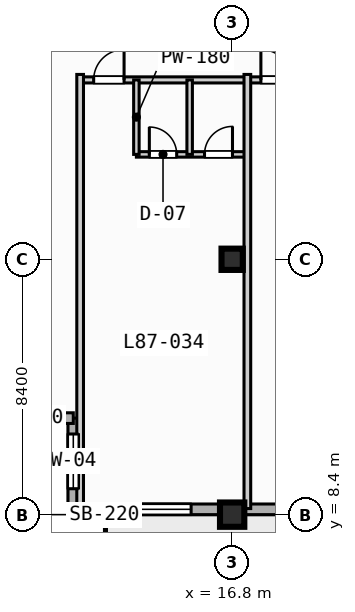
"""IFC4 building model, lengths in metres.
Left out: names, types, materials, properties, quantities, classifications, styles, units other than length and angle.
Written with IfcOpenShell. Run it as: python <this file> out.ifc"""

import sys

from ifc_helpers import new_model, si_unit, direction, frame, frame_2d, origin, origin_2d, place, context, subcontext, project, spatial, rectangle, extrude, element, fill, save


model = new_model("IFC4")
c1 = context("Model", 3, precision=1e-05, world=origin(), true_north=direction((0.0, 1.0)))
c2 = subcontext(c1, "Body", "Model", "MODEL_VIEW")
j1 = project(units=[si_unit("LENGTHUNIT", "METRE"), si_unit("PLANEANGLEUNIT", "RADIAN")], contexts=[c1])
p1 = place(None, origin())
s1 = spatial("IfcSite", under=j1, at=p1, CompositionType="ELEMENT")
p2 = place(p1, origin())
s2 = spatial("IfcBuilding", under=s1, at=p2, CompositionType="ELEMENT")
p3 = place(p2, frame((0.0, 0.0, 351.5)))
s3 = spatial("IfcBuildingStorey", under=s2, at=p3, CompositionType="ELEMENT", Elevation=351.5)
p4 = place(p3, frame((16.8, 8.4, 0.0), z_axis=(0.0, 0.0, 1.0), x_axis=(1.0, 0.0, 0.0)))
e1 = element("IfcColumn", 1, at=p4, inside=s3, PredefinedType="COLUMN", context=c2, shape_type="SweptSolid", body=[
    extrude(rectangle(XDim=0.8, YDim=0.8, at=origin_2d()), origin(), (0.0, 0.0, 1.0), 3.9),
])
p5 = place(p3, frame((16.8, 16.8, 0.0), z_axis=(0.0, 0.0, 1.0), x_axis=(1.0, 0.0, 0.0)))
e2 = element("IfcColumn", 2, at=p5, inside=s3, PredefinedType="COLUMN", context=c2, shape_type="SweptSolid", body=[
    extrude(rectangle(XDim=0.7, YDim=0.7, at=origin_2d()), origin(), (0.0, 0.0, 1.0), 3.9),
])
p6 = place(p3, frame((11.575, 8.575, 0.0), z_axis=(0.0, 0.0, 1.0), x_axis=(0.0, 1.0, 0.0)))
e3 = element("IfcWall", 3, at=p6, inside=s3, PredefinedType="STANDARD", context=c2, shape_type="SweptSolid", body=[
    extrude(rectangle(XDim=3.0, YDim=0.35, at=frame_2d((1.5, 0.0))), origin(), (0.0, 0.0, 1.0), 3.67),
])
p7 = place(p6, frame((0.677, 0.0, 0.85)))
e4 = element("IfcOpeningElement", 4, at=p7, cuts=e3, PredefinedType="OPENING", context=c2, shape_type="SweptSolid", body=[
    extrude(rectangle(XDim=1.8, YDim=1.8, at=frame_2d((0.9, 0.9))), frame((0.0, 0.185, 0.0), z_axis=(0.0, -1.0, 0.0), x_axis=(1.0, 0.0, 0.0)), (0.0, 0.0, 1.0), 0.37),
])
p8 = place(p3, frame((11.575, 11.575, 0.0), z_axis=(0.0, 0.0, 1.0), x_axis=(-1.0, 0.0, 0.0)))
e5 = element("IfcWall", 5, at=p8, inside=s3, PredefinedType="STANDARD", context=c2, shape_type="SweptSolid", body=[
    extrude(rectangle(XDim=3.0, YDim=0.35, at=frame_2d((1.5, 0.0))), origin(), (0.0, 0.0, 1.0), 3.67),
])
p9 = place(p3, frame((64.025, 8.575, 0.0), z_axis=(0.0, 0.0, 1.0), x_axis=(-1.0, 0.0, 0.0)))
e6 = element("IfcWall", 6, at=p9, inside=s3, PredefinedType="STANDARD", context=c2, shape_type="SweptSolid", body=[
    extrude(rectangle(XDim=52.45, YDim=0.35, at=frame_2d((26.225, 0.0))), origin(), (0.0, 0.0, 1.0), 3.67),
])
p10 = place(p9, frame((33.425, 0.0, 0.0)))
e7 = element("IfcOpeningElement", 7, at=p10, cuts=e6, PredefinedType="OPENING", context=c2, shape_type="SweptSolid", body=[
    extrude(rectangle(XDim=1.4, YDim=2.2, at=frame_2d((0.7, 1.1))), frame((0.0, 0.185, 0.0), z_axis=(0.0, -1.0, 0.0), x_axis=(1.0, 0.0, 0.0)), (0.0, 0.0, 1.0), 0.37),
])
p11 = place(p9, frame((41.825, 0.0, 0.85)))
e8 = element("IfcOpeningElement", 8, at=p11, cuts=e6, PredefinedType="OPENING", context=c2, shape_type="SweptSolid", body=[
    extrude(rectangle(XDim=2.4, YDim=1.95, at=frame_2d((1.2, 0.975))), frame((0.0, 0.185, 0.0), z_axis=(0.0, -1.0, 0.0), x_axis=(1.0, 0.0, 0.0)), (0.0, 0.0, 1.0), 0.37),
])
p12 = place(p9, frame((25.025, 0.0, 0.85)))
e9 = element("IfcOpeningElement", 9, at=p12, cuts=e6, PredefinedType="OPENING", context=c2, shape_type="SweptSolid", body=[
    extrude(rectangle(XDim=2.4, YDim=1.95, at=frame_2d((1.2, 0.975))), frame((0.0, 0.185, 0.0), z_axis=(0.0, -1.0, 0.0), x_axis=(1.0, 0.0, 0.0)), (0.0, 0.0, 1.0), 0.37),
])
p13 = place(p9, frame((16.925, 0.0, 0.85)))
e10 = element("IfcOpeningElement", 10, at=p13, cuts=e6, PredefinedType="OPENING", context=c2, shape_type="SweptSolid", body=[
    extrude(rectangle(XDim=1.8, YDim=1.8, at=frame_2d((0.9, 0.9))), frame((0.0, 0.185, 0.0), z_axis=(0.0, -1.0, 0.0), x_axis=(1.0, 0.0, 0.0)), (0.0, 0.0, 1.0), 0.37),
])
p14 = place(p9, frame((48.575, 0.0, 0.85)))
e11 = element("IfcOpeningElement", 11, at=p14, cuts=e6, PredefinedType="OPENING", context=c2, shape_type="SweptSolid", body=[
    extrude(rectangle(XDim=1.8, YDim=1.8, at=frame_2d((0.9, 0.9))), frame((0.0, 0.185, 0.0), z_axis=(0.0, -1.0, 0.0), x_axis=(1.0, 0.0, 0.0)), (0.0, 0.0, 1.0), 0.37),
])
p15 = place(p9, frame((36.325, 0.0, 0.85)))
e12 = element("IfcOpeningElement", 12, at=p15, cuts=e6, PredefinedType="OPENING", context=c2, shape_type="SweptSolid", body=[
    extrude(rectangle(XDim=1.8, YDim=1.8, at=frame_2d((0.9, 0.9))), frame((0.0, 0.185, 0.0), z_axis=(0.0, -1.0, 0.0), x_axis=(1.0, 0.0, 0.0)), (0.0, 0.0, 1.0), 0.37),
])
p16 = place(p3, frame((11.8, 22.7, 0.0), z_axis=(0.0, 0.0, 1.0), x_axis=(1.0, 0.0, 0.0)))
e13 = element("IfcWall", 13, at=p16, inside=s3, PredefinedType="PARTITIONING", context=c2, shape_type="SweptSolid", body=[
    extrude(rectangle(XDim=27.6, YDim=0.2, at=frame_2d((13.8, 0.0))), origin(), (0.0, 0.0, 1.0), 3.67),
])
p17 = place(p16, frame((0.445, 0.0, 0.0)))
e14 = element("IfcOpeningElement", 14, at=p17, cuts=e13, PredefinedType="OPENING", context=c2, shape_type="SweptSolid", body=[
    extrude(rectangle(XDim=1.0, YDim=2.15, at=frame_2d((0.5, 1.075))), frame((0.0, 0.11, 0.0), z_axis=(0.0, -1.0, 0.0), x_axis=(1.0, 0.0, 0.0)), (0.0, 0.0, 1.0), 0.22),
])
p18 = place(p16, frame((5.945, 0.0, 0.0)))
e15 = element("IfcOpeningElement", 15, at=p18, cuts=e13, PredefinedType="OPENING", context=c2, shape_type="SweptSolid", body=[
    extrude(rectangle(XDim=1.0, YDim=2.15, at=frame_2d((0.5, 1.075))), frame((0.0, 0.11, 0.0), z_axis=(0.0, -1.0, 0.0), x_axis=(1.0, 0.0, 0.0)), (0.0, 0.0, 1.0), 0.22),
])
p19 = place(p16, frame((11.445, 0.0, 0.0)))
e16 = element("IfcOpeningElement", 16, at=p19, cuts=e13, PredefinedType="OPENING", context=c2, shape_type="SweptSolid", body=[
    extrude(rectangle(XDim=1.0, YDim=2.15, at=frame_2d((0.5, 1.075))), frame((0.0, 0.11, 0.0), z_axis=(0.0, -1.0, 0.0), x_axis=(1.0, 0.0, 0.0)), (0.0, 0.0, 1.0), 0.22),
])
p20 = place(p16, frame((16.945, 0.0, 0.0)))
e17 = element("IfcOpeningElement", 17, at=p20, cuts=e13, PredefinedType="OPENING", context=c2, shape_type="SweptSolid", body=[
    extrude(rectangle(XDim=1.0, YDim=2.15, at=frame_2d((0.5, 1.075))), frame((0.0, 0.11, 0.0), z_axis=(0.0, -1.0, 0.0), x_axis=(1.0, 0.0, 0.0)), (0.0, 0.0, 1.0), 0.22),
])
p21 = place(p16, frame((22.445, 0.0, 0.0)))
e18 = element("IfcOpeningElement", 18, at=p21, cuts=e13, PredefinedType="OPENING", context=c2, shape_type="SweptSolid", body=[
    extrude(rectangle(XDim=1.0, YDim=2.15, at=frame_2d((0.5, 1.075))), frame((0.0, 0.11, 0.0), z_axis=(0.0, -1.0, 0.0), x_axis=(1.0, 0.0, 0.0)), (0.0, 0.0, 1.0), 0.22),
])
p22 = place(p3, frame((11.8, 8.6, 0.0), z_axis=(0.0, 0.0, 1.0), x_axis=(0.0, 1.0, 0.0)))
e19 = element("IfcWall", 19, at=p22, inside=s3, PredefinedType="PARTITIONING", context=c2, shape_type="SweptSolid", body=[
    extrude(rectangle(XDim=14.28, YDim=0.22, at=frame_2d((7.14, 0.0))), origin(), (0.0, 0.0, 1.0), 3.67),
])
p23 = place(p3, frame((13.65, 20.25, 0.0), z_axis=(0.0, 0.0, 1.0), x_axis=(1.0, 0.0, 0.0)))
e20 = element("IfcWall", 20, at=p23, inside=s3, PredefinedType="PLUMBINGWALL", context=c2, shape_type="SweptSolid", body=[
    extrude(rectangle(XDim=3.65, YDim=0.18, at=frame_2d((1.825, 0.0))), origin(), (0.0, 0.0, 1.0), 3.67),
])
p24 = place(p23, frame((0.426, 0.0, 0.0)))
e21 = element("IfcOpeningElement", 21, at=p24, cuts=e20, PredefinedType="OPENING", context=c2, shape_type="SweptSolid", body=[
    extrude(rectangle(XDim=0.9, YDim=2.1, at=frame_2d((0.45, 1.05))), frame((0.0, 0.1, 0.0), z_axis=(0.0, -1.0, 0.0), x_axis=(1.0, 0.0, 0.0)), (0.0, 0.0, 1.0), 0.2),
])
p25 = place(p23, frame((2.241, 0.0, 0.0)))
e22 = element("IfcOpeningElement", 22, at=p25, cuts=e20, PredefinedType="OPENING", context=c2, shape_type="SweptSolid", body=[
    extrude(rectangle(XDim=0.92, YDim=2.1, at=frame_2d((0.46, 1.05))), frame((0.0, 0.1, 0.0), z_axis=(0.0, -1.0, 0.0), x_axis=(1.0, 0.0, 0.0)), (0.0, 0.0, 1.0), 0.2),
])
for number, where, z_axis, x_axis in (
    (23, (13.65, 20.25, 0.0), (0.0, 0.0, 1.0), (0.0, 1.0, 0.0)),
    (24, (15.402, 20.25, 0.0), (0.0, 0.0, 1.0), (0.0, 1.0, 0.0)),
):
    element("IfcWall", number, at=place(p3, frame(where, z_axis=z_axis, x_axis=x_axis)), inside=s3, PredefinedType="PLUMBINGWALL", context=c2, shape_type="SweptSolid", body=[
        extrude(rectangle(XDim=2.45, YDim=0.18, at=frame_2d((1.225, 0.0))), origin(), (0.0, 0.0, 1.0), 3.67),
    ])
p26 = place(p3, frame((17.3, 8.6, 0.0), z_axis=(0.0, 0.0, 1.0), x_axis=(0.0, 1.0, 0.0)))
e25 = element("IfcWall", 25, at=p26, inside=s3, PredefinedType="PARTITIONING", context=c2, shape_type="SweptSolid", body=[
    extrude(rectangle(XDim=14.28, YDim=0.22, at=frame_2d((7.14, 0.0))), origin(), (0.0, 0.0, 1.0), 3.67),
])
p27 = place(p7, origin())
e26 = element("IfcWindow", 26, at=p27, inside=s3, PartitioningType="SINGLE_PANEL", PredefinedType="WINDOW", context=c2, shape_type="SweptSolid", body=[
    extrude(rectangle(XDim=1.8, YDim=1.8, at=frame_2d((0.9, 0.9))), frame((0.0, 0.03, 0.0), z_axis=(0.0, -1.0, 0.0), x_axis=(1.0, 0.0, 0.0)), (0.0, 0.0, 1.0), 0.06),
])
fill(e4, e26)
p28 = place(p14, origin())
e27 = element("IfcWindow", 27, at=p28, inside=s3, PartitioningType="SINGLE_PANEL", PredefinedType="WINDOW", context=c2, shape_type="SweptSolid", body=[
    extrude(rectangle(XDim=1.8, YDim=1.8, at=frame_2d((0.9, 0.9))), frame((0.0, 0.03, 0.0), z_axis=(0.0, -1.0, 0.0), x_axis=(1.0, 0.0, 0.0)), (0.0, 0.0, 1.0), 0.06),
])
fill(e11, e27)
p29 = place(p17, origin())
e28 = element("IfcDoor", 28, at=p29, inside=s3, OperationType="SINGLE_SWING_RIGHT", PredefinedType="DOOR", context=c2, shape_type="SweptSolid", body=[
    extrude(rectangle(XDim=1.0, YDim=2.15, at=frame_2d((0.5, 1.075))), frame((0.0, 0.025, 0.0), z_axis=(0.0, -1.0, 0.0), x_axis=(1.0, 0.0, 0.0)), (0.0, 0.0, 1.0), 0.05),
])
fill(e14, e28)
p30 = place(p18, origin())
e29 = element("IfcDoor", 29, at=p30, inside=s3, OperationType="SINGLE_SWING_LEFT", PredefinedType="DOOR", context=c2, shape_type="SweptSolid", body=[
    extrude(rectangle(XDim=1.0, YDim=2.15, at=frame_2d((0.5, 1.075))), frame((0.0, 0.025, 0.0), z_axis=(0.0, -1.0, 0.0), x_axis=(1.0, 0.0, 0.0)), (0.0, 0.0, 1.0), 0.05),
])
fill(e15, e29)
p31 = place(p24, origin())
e30 = element("IfcDoor", 30, at=p31, inside=s3, OperationType="SINGLE_SWING_LEFT", PredefinedType="DOOR", context=c2, shape_type="SweptSolid", body=[
    extrude(rectangle(XDim=0.9, YDim=2.1, at=frame_2d((0.45, 1.05))), frame((0.0, 0.025, 0.0), z_axis=(0.0, -1.0, 0.0), x_axis=(1.0, 0.0, 0.0)), (0.0, 0.0, 1.0), 0.05),
])
fill(e21, e30)
p32 = place(p25, origin())
e31 = element("IfcDoor", 31, at=p32, inside=s3, OperationType="SINGLE_SWING_RIGHT", PredefinedType="DOOR", context=c2, shape_type="SweptSolid", body=[
    extrude(rectangle(XDim=0.92, YDim=2.1, at=frame_2d((0.46, 1.05))), frame((0.0, 0.025, 0.0), z_axis=(0.0, -1.0, 0.0), x_axis=(1.0, 0.0, 0.0)), (0.0, 0.0, 1.0), 0.05),
])
fill(e22, e31)
save(model, sys.argv[1])
